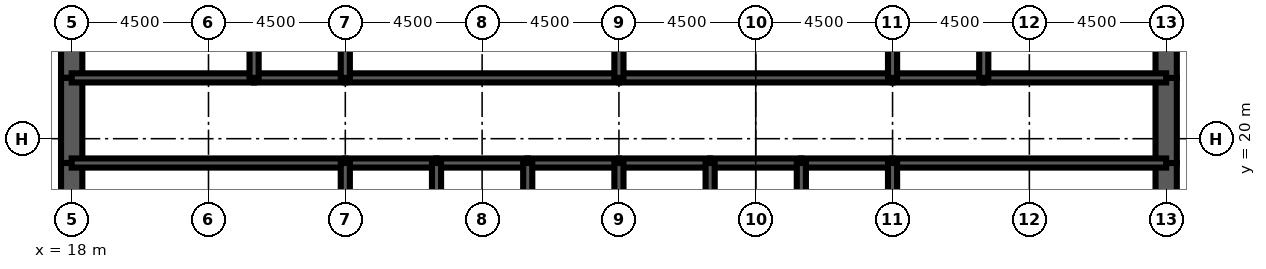
"""IFC4 building model, lengths in metres.
Left out: names, types, materials, properties, quantities, classifications, styles, units other than length and angle.
Written with IfcOpenShell. Run it as: python <this file> out.ifc"""

import sys

from ifc_helpers import new_model, si_unit, direction, frame, frame_2d, origin, place, context, subcontext, project, spatial, rectangle, extrude, element, fill, save


model = new_model("IFC4")
c1 = context("Model", 3, precision=1e-05, world=origin(), true_north=direction((0.0, 1.0)))
c2 = subcontext(c1, "Body", "Model", "MODEL_VIEW")
j1 = project(units=[si_unit("LENGTHUNIT", "METRE"), si_unit("PLANEANGLEUNIT", "RADIAN")], contexts=[c1])
p1 = place(None, origin())
s1 = spatial("IfcSite", under=j1, at=p1, CompositionType="ELEMENT")
p2 = place(p1, origin())
s2 = spatial("IfcBuilding", under=s1, at=p2, CompositionType="ELEMENT")
p3 = place(p2, frame((0.0, 0.0, 279.5)))
s3 = spatial("IfcBuildingStorey", under=s2, at=p3, CompositionType="ELEMENT", Elevation=279.5)
p4 = place(p3, frame((18.0, 26.0, 0.0), z_axis=(0.0, 0.0, 1.0), x_axis=(0.0, -1.0, 0.0)))
e1 = element("IfcWall", 1, at=p4, inside=s3, PredefinedType="SHEAR", context=c2, shape_type="SweptSolid", body=[
    extrude(rectangle(XDim=4.0, YDim=0.7, at=frame_2d((2.0, 0.0))), origin(), (0.0, 0.0, 1.0), 4.2),
])
p5 = place(p3, frame((18.0, 22.0, 0.0), z_axis=(0.0, 0.0, 1.0), x_axis=(0.0, -1.0, 0.0)))
e2 = element("IfcWall", 2, at=p5, inside=s3, PredefinedType="SHEAR", context=c2, shape_type="SweptSolid", body=[
    extrude(rectangle(XDim=2.8, YDim=0.7, at=frame_2d((1.4, 0.0))), origin(), (0.0, 0.0, 1.0), 4.2),
])
p6 = place(p5, frame((0.6, 0.0, 0.0)))
e3 = element("IfcOpeningElement", 3, at=p6, cuts=e2, PredefinedType="OPENING", context=c2, shape_type="SweptSolid", body=[
    extrude(rectangle(XDim=1.8, YDim=2.1, at=frame_2d((0.9, 1.05))), frame((0.0, 0.36, 0.0), z_axis=(0.0, -1.0, 0.0), x_axis=(1.0, 0.0, 0.0)), (0.0, 0.0, 1.0), 0.72),
])
for number, where, z_axis, x_axis in (
    (4, (18.0, 19.2, 0.0), (0.0, 0.0, 1.0), (0.0, -1.0, 0.0)),
    (5, (54.0, 16.0, 0.0), (0.0, 0.0, 1.0), (0.0, 1.0, 0.0)),
):
    element("IfcWall", number, at=place(p3, frame(where, z_axis=z_axis, x_axis=x_axis)), inside=s3, PredefinedType="SHEAR", context=c2, shape_type="SweptSolid", body=[
        extrude(rectangle(XDim=3.2, YDim=0.7, at=frame_2d((1.6, 0.0))), origin(), (0.0, 0.0, 1.0), 4.2),
    ])
p7 = place(p3, frame((54.0, 19.2, 0.0), z_axis=(0.0, 0.0, 1.0), x_axis=(0.0, 1.0, 0.0)))
e6 = element("IfcWall", 6, at=p7, inside=s3, PredefinedType="SHEAR", context=c2, shape_type="SweptSolid", body=[
    extrude(rectangle(XDim=2.8, YDim=0.7, at=frame_2d((1.4, 0.0))), origin(), (0.0, 0.0, 1.0), 4.2),
])
p8 = place(p7, frame((0.4, 0.0, 0.0)))
e7 = element("IfcOpeningElement", 7, at=p8, cuts=e6, PredefinedType="OPENING", context=c2, shape_type="SweptSolid", body=[
    extrude(rectangle(XDim=1.8, YDim=2.1, at=frame_2d((0.9, 1.05))), frame((0.0, 0.36, 0.0), z_axis=(0.0, -1.0, 0.0), x_axis=(1.0, 0.0, 0.0)), (0.0, 0.0, 1.0), 0.72),
])
p9 = place(p3, frame((54.0, 22.0, 0.0), z_axis=(0.0, 0.0, 1.0), x_axis=(0.0, 1.0, 0.0)))
e8 = element("IfcWall", 8, at=p9, inside=s3, PredefinedType="SHEAR", context=c2, shape_type="SweptSolid", body=[
    extrude(rectangle(XDim=4.0, YDim=0.7, at=frame_2d((2.0, 0.0))), origin(), (0.0, 0.0, 1.0), 4.2),
])
p10 = place(p3, frame((18.0, 19.2, 0.0), z_axis=(0.0, 0.0, 1.0), x_axis=(1.0, 0.0, 0.0)))
e9 = element("IfcWall", 9, at=p10, inside=s3, PredefinedType="SOLIDWALL", context=c2, shape_type="SweptSolid", body=[
    extrude(rectangle(XDim=9.0, YDim=0.3, at=frame_2d((4.5, 0.0))), origin(), (0.0, 0.0, 1.0), 4.2),
])
p11 = place(p10, frame((0.65, 0.0, 0.0)))
e10 = element("IfcOpeningElement", 10, at=p11, cuts=e9, PredefinedType="OPENING", context=c2, shape_type="SweptSolid", body=[
    extrude(rectangle(XDim=1.0, YDim=2.1, at=frame_2d((0.5, 1.05))), frame((0.0, 0.16, 0.0), z_axis=(0.0, -1.0, 0.0), x_axis=(1.0, 0.0, 0.0)), (0.0, 0.0, 1.0), 0.32),
])
p12 = place(p3, frame((27.0, 19.2, 0.0), z_axis=(0.0, 0.0, 1.0), x_axis=(1.0, 0.0, 0.0)))
e11 = element("IfcWall", 11, at=p12, inside=s3, PredefinedType="SOLIDWALL", context=c2, shape_type="SweptSolid", body=[
    extrude(rectangle(XDim=3.0, YDim=0.3, at=frame_2d((1.5, 0.0))), origin(), (0.0, 0.0, 1.0), 4.2),
])
p13 = place(p12, frame((0.95, 0.0, 0.0)))
e12 = element("IfcOpeningElement", 12, at=p13, cuts=e11, PredefinedType="OPENING", context=c2, shape_type="SweptSolid", body=[
    extrude(rectangle(XDim=1.1, YDim=2.2, at=frame_2d((0.55, 1.1))), frame((0.0, 0.16, 0.0), z_axis=(0.0, -1.0, 0.0), x_axis=(1.0, 0.0, 0.0)), (0.0, 0.0, 1.0), 0.32),
])
p14 = place(p3, frame((30.0, 19.2, 0.0), z_axis=(0.0, 0.0, 1.0), x_axis=(1.0, 0.0, 0.0)))
e13 = element("IfcWall", 13, at=p14, inside=s3, PredefinedType="SOLIDWALL", context=c2, shape_type="SweptSolid", body=[
    extrude(rectangle(XDim=3.0, YDim=0.3, at=frame_2d((1.5, 0.0))), origin(), (0.0, 0.0, 1.0), 4.2),
])
p15 = place(p14, frame((0.95, 0.0, 0.0)))
e14 = element("IfcOpeningElement", 14, at=p15, cuts=e13, PredefinedType="OPENING", context=c2, shape_type="SweptSolid", body=[
    extrude(rectangle(XDim=1.1, YDim=2.2, at=frame_2d((0.55, 1.1))), frame((0.0, 0.16, 0.0), z_axis=(0.0, -1.0, 0.0), x_axis=(1.0, 0.0, 0.0)), (0.0, 0.0, 1.0), 0.32),
])
p16 = place(p3, frame((33.0, 19.2, 0.0), z_axis=(0.0, 0.0, 1.0), x_axis=(1.0, 0.0, 0.0)))
e15 = element("IfcWall", 15, at=p16, inside=s3, PredefinedType="SOLIDWALL", context=c2, shape_type="SweptSolid", body=[
    extrude(rectangle(XDim=3.0, YDim=0.3, at=frame_2d((1.5, 0.0))), origin(), (0.0, 0.0, 1.0), 4.2),
])
p17 = place(p16, frame((0.95, 0.0, 0.0)))
e16 = element("IfcOpeningElement", 16, at=p17, cuts=e15, PredefinedType="OPENING", context=c2, shape_type="SweptSolid", body=[
    extrude(rectangle(XDim=1.1, YDim=2.2, at=frame_2d((0.55, 1.1))), frame((0.0, 0.16, 0.0), z_axis=(0.0, -1.0, 0.0), x_axis=(1.0, 0.0, 0.0)), (0.0, 0.0, 1.0), 0.32),
])
p18 = place(p3, frame((36.0, 19.2, 0.0), z_axis=(0.0, 0.0, 1.0), x_axis=(1.0, 0.0, 0.0)))
e17 = element("IfcWall", 17, at=p18, inside=s3, PredefinedType="SOLIDWALL", context=c2, shape_type="SweptSolid", body=[
    extrude(rectangle(XDim=3.0, YDim=0.3, at=frame_2d((1.5, 0.0))), origin(), (0.0, 0.0, 1.0), 4.2),
])
p19 = place(p18, frame((0.95, 0.0, 0.0)))
e18 = element("IfcOpeningElement", 18, at=p19, cuts=e17, PredefinedType="OPENING", context=c2, shape_type="SweptSolid", body=[
    extrude(rectangle(XDim=1.1, YDim=2.2, at=frame_2d((0.55, 1.1))), frame((0.0, 0.16, 0.0), z_axis=(0.0, -1.0, 0.0), x_axis=(1.0, 0.0, 0.0)), (0.0, 0.0, 1.0), 0.32),
])
p20 = place(p3, frame((39.0, 19.2, 0.0), z_axis=(0.0, 0.0, 1.0), x_axis=(1.0, 0.0, 0.0)))
e19 = element("IfcWall", 19, at=p20, inside=s3, PredefinedType="SOLIDWALL", context=c2, shape_type="SweptSolid", body=[
    extrude(rectangle(XDim=3.0, YDim=0.3, at=frame_2d((1.5, 0.0))), origin(), (0.0, 0.0, 1.0), 4.2),
])
p21 = place(p20, frame((1.0, 0.0, 0.0)))
e20 = element("IfcOpeningElement", 20, at=p21, cuts=e19, PredefinedType="OPENING", context=c2, shape_type="SweptSolid", body=[
    extrude(rectangle(XDim=1.0, YDim=2.1, at=frame_2d((0.5, 1.05))), frame((0.0, 0.16, 0.0), z_axis=(0.0, -1.0, 0.0), x_axis=(1.0, 0.0, 0.0)), (0.0, 0.0, 1.0), 0.32),
])
p22 = place(p3, frame((42.0, 19.2, 0.0), z_axis=(0.0, 0.0, 1.0), x_axis=(1.0, 0.0, 0.0)))
e21 = element("IfcWall", 21, at=p22, inside=s3, PredefinedType="SOLIDWALL", context=c2, shape_type="SweptSolid", body=[
    extrude(rectangle(XDim=3.0, YDim=0.3, at=frame_2d((1.5, 0.0))), origin(), (0.0, 0.0, 1.0), 4.2),
])
p23 = place(p22, frame((1.0, 0.0, 0.0)))
e22 = element("IfcOpeningElement", 22, at=p23, cuts=e21, PredefinedType="OPENING", context=c2, shape_type="SweptSolid", body=[
    extrude(rectangle(XDim=1.0, YDim=2.1, at=frame_2d((0.5, 1.05))), frame((0.0, 0.16, 0.0), z_axis=(0.0, -1.0, 0.0), x_axis=(1.0, 0.0, 0.0)), (0.0, 0.0, 1.0), 0.32),
])
p24 = place(p3, frame((45.0, 19.2, 0.0), z_axis=(0.0, 0.0, 1.0), x_axis=(1.0, 0.0, 0.0)))
e23 = element("IfcWall", 23, at=p24, inside=s3, PredefinedType="SOLIDWALL", context=c2, shape_type="SweptSolid", body=[
    extrude(rectangle(XDim=9.0, YDim=0.3, at=frame_2d((4.5, 0.0))), origin(), (0.0, 0.0, 1.0), 4.2),
])
p25 = place(p24, frame((7.35, 0.0, 0.0)))
e24 = element("IfcOpeningElement", 24, at=p25, cuts=e23, PredefinedType="OPENING", context=c2, shape_type="SweptSolid", body=[
    extrude(rectangle(XDim=1.0, YDim=2.1, at=frame_2d((0.5, 1.05))), frame((0.0, 0.16, 0.0), z_axis=(0.0, -1.0, 0.0), x_axis=(1.0, 0.0, 0.0)), (0.0, 0.0, 1.0), 0.32),
])
p26 = place(p3, frame((18.0, 22.0, 0.0), z_axis=(0.0, 0.0, 1.0), x_axis=(1.0, 0.0, 0.0)))
e25 = element("IfcWall", 25, at=p26, inside=s3, PredefinedType="SOLIDWALL", context=c2, shape_type="SweptSolid", body=[
    extrude(rectangle(XDim=6.0, YDim=0.3, at=frame_2d((3.0, 0.0))), origin(), (0.0, 0.0, 1.0), 4.2),
])
p27 = place(p26, frame((2.0, 0.0, 0.0)))
e26 = element("IfcOpeningElement", 26, at=p27, cuts=e25, PredefinedType="OPENING", context=c2, shape_type="SweptSolid", body=[
    extrude(rectangle(XDim=1.0, YDim=2.1, at=frame_2d((0.5, 1.05))), frame((0.0, 0.16, 0.0), z_axis=(0.0, -1.0, 0.0), x_axis=(1.0, 0.0, 0.0)), (0.0, 0.0, 1.0), 0.32),
])
p28 = place(p3, frame((24.0, 22.0, 0.0), z_axis=(0.0, 0.0, 1.0), x_axis=(1.0, 0.0, 0.0)))
e27 = element("IfcWall", 27, at=p28, inside=s3, PredefinedType="SOLIDWALL", context=c2, shape_type="SweptSolid", body=[
    extrude(rectangle(XDim=3.0, YDim=0.3, at=frame_2d((1.5, 0.0))), origin(), (0.0, 0.0, 1.0), 4.2),
])
p29 = place(p28, frame((1.0, 0.0, 0.0)))
e28 = element("IfcOpeningElement", 28, at=p29, cuts=e27, PredefinedType="OPENING", context=c2, shape_type="SweptSolid", body=[
    extrude(rectangle(XDim=1.0, YDim=2.1, at=frame_2d((0.5, 1.05))), frame((0.0, 0.16, 0.0), z_axis=(0.0, -1.0, 0.0), x_axis=(1.0, 0.0, 0.0)), (0.0, 0.0, 1.0), 0.32),
])
p30 = place(p3, frame((27.0, 22.0, 0.0), z_axis=(0.0, 0.0, 1.0), x_axis=(1.0, 0.0, 0.0)))
e29 = element("IfcWall", 29, at=p30, inside=s3, PredefinedType="SOLIDWALL", context=c2, shape_type="SweptSolid", body=[
    extrude(rectangle(XDim=9.0, YDim=0.3, at=frame_2d((4.5, 0.0))), origin(), (0.0, 0.0, 1.0), 4.2),
])
p31 = place(p30, frame((4.0, 0.0, 0.0)))
e30 = element("IfcOpeningElement", 30, at=p31, cuts=e29, PredefinedType="OPENING", context=c2, shape_type="SweptSolid", body=[
    extrude(rectangle(XDim=1.0, YDim=2.1, at=frame_2d((0.5, 1.05))), frame((0.0, 0.16, 0.0), z_axis=(0.0, -1.0, 0.0), x_axis=(1.0, 0.0, 0.0)), (0.0, 0.0, 1.0), 0.32),
])
p32 = place(p3, frame((36.0, 22.0, 0.0), z_axis=(0.0, 0.0, 1.0), x_axis=(1.0, 0.0, 0.0)))
e31 = element("IfcWall", 31, at=p32, inside=s3, PredefinedType="SOLIDWALL", context=c2, shape_type="SweptSolid", body=[
    extrude(rectangle(XDim=9.0, YDim=0.3, at=frame_2d((4.5, 0.0))), origin(), (0.0, 0.0, 1.0), 4.2),
])
p33 = place(p32, frame((4.0, 0.0, 0.0)))
e32 = element("IfcOpeningElement", 32, at=p33, cuts=e31, PredefinedType="OPENING", context=c2, shape_type="SweptSolid", body=[
    extrude(rectangle(XDim=1.0, YDim=2.1, at=frame_2d((0.5, 1.05))), frame((0.0, 0.16, 0.0), z_axis=(0.0, -1.0, 0.0), x_axis=(1.0, 0.0, 0.0)), (0.0, 0.0, 1.0), 0.32),
])
p34 = place(p3, frame((45.0, 22.0, 0.0), z_axis=(0.0, 0.0, 1.0), x_axis=(1.0, 0.0, 0.0)))
e33 = element("IfcWall", 33, at=p34, inside=s3, PredefinedType="SOLIDWALL", context=c2, shape_type="SweptSolid", body=[
    extrude(rectangle(XDim=3.0, YDim=0.3, at=frame_2d((1.5, 0.0))), origin(), (0.0, 0.0, 1.0), 4.2),
])
p35 = place(p34, frame((1.0, 0.0, 0.0)))
e34 = element("IfcOpeningElement", 34, at=p35, cuts=e33, PredefinedType="OPENING", context=c2, shape_type="SweptSolid", body=[
    extrude(rectangle(XDim=1.0, YDim=2.1, at=frame_2d((0.5, 1.05))), frame((0.0, 0.16, 0.0), z_axis=(0.0, -1.0, 0.0), x_axis=(1.0, 0.0, 0.0)), (0.0, 0.0, 1.0), 0.32),
])
p36 = place(p3, frame((48.0, 22.0, 0.0), z_axis=(0.0, 0.0, 1.0), x_axis=(1.0, 0.0, 0.0)))
e35 = element("IfcWall", 35, at=p36, inside=s3, PredefinedType="SOLIDWALL", context=c2, shape_type="SweptSolid", body=[
    extrude(rectangle(XDim=6.0, YDim=0.3, at=frame_2d((3.0, 0.0))), origin(), (0.0, 0.0, 1.0), 4.2),
])
p37 = place(p36, frame((2.0, 0.0, 0.0)))
e36 = element("IfcOpeningElement", 36, at=p37, cuts=e35, PredefinedType="OPENING", context=c2, shape_type="SweptSolid", body=[
    extrude(rectangle(XDim=1.0, YDim=2.1, at=frame_2d((0.5, 1.05))), frame((0.0, 0.16, 0.0), z_axis=(0.0, -1.0, 0.0), x_axis=(1.0, 0.0, 0.0)), (0.0, 0.0, 1.0), 0.32),
])
p38 = place(p36, frame((4.1, 0.0, 0.0)))
e37 = element("IfcOpeningElement", 37, at=p38, cuts=e35, PredefinedType="OPENING", context=c2, shape_type="SweptSolid", body=[
    extrude(rectangle(XDim=1.0, YDim=2.1, at=frame_2d((0.5, 1.05))), frame((0.0, 0.16, 0.0), z_axis=(0.0, -1.0, 0.0), x_axis=(1.0, 0.0, 0.0)), (0.0, 0.0, 1.0), 0.32),
])
for number, where, z_axis, x_axis in (
    (38, (27.0, 16.0, 0.0), (0.0, 0.0, 1.0), (0.0, 1.0, 0.0)),
    (39, (30.0, 16.0, 0.0), (0.0, 0.0, 1.0), (0.0, 1.0, 0.0)),
    (40, (33.0, 16.0, 0.0), (0.0, 0.0, 1.0), (0.0, 1.0, 0.0)),
    (41, (36.0, 16.0, 0.0), (0.0, 0.0, 1.0), (0.0, 1.0, 0.0)),
    (42, (39.0, 16.0, 0.0), (0.0, 0.0, 1.0), (0.0, 1.0, 0.0)),
    (43, (42.0, 16.0, 0.0), (0.0, 0.0, 1.0), (0.0, 1.0, 0.0)),
    (44, (45.0, 16.0, 0.0), (0.0, 0.0, 1.0), (0.0, 1.0, 0.0)),
):
    element("IfcWall", number, at=place(p3, frame(where, z_axis=z_axis, x_axis=x_axis)), inside=s3, PredefinedType="SOLIDWALL", context=c2, shape_type="SweptSolid", body=[
        extrude(rectangle(XDim=3.2, YDim=0.3, at=frame_2d((1.6, 0.0))), origin(), (0.0, 0.0, 1.0), 4.2),
    ])
for number, where, z_axis, x_axis in (
    (45, (24.0, 22.0, 0.0), (0.0, 0.0, 1.0), (0.0, 1.0, 0.0)),
    (46, (27.0, 22.0, 0.0), (0.0, 0.0, 1.0), (0.0, 1.0, 0.0)),
    (47, (36.0, 22.0, 0.0), (0.0, 0.0, 1.0), (0.0, 1.0, 0.0)),
    (48, (45.0, 22.0, 0.0), (0.0, 0.0, 1.0), (0.0, 1.0, 0.0)),
    (49, (48.0, 22.0, 0.0), (0.0, 0.0, 1.0), (0.0, 1.0, 0.0)),
):
    element("IfcWall", number, at=place(p3, frame(where, z_axis=z_axis, x_axis=x_axis)), inside=s3, PredefinedType="SOLIDWALL", context=c2, shape_type="SweptSolid", body=[
        extrude(rectangle(XDim=4.0, YDim=0.3, at=frame_2d((2.0, 0.0))), origin(), (0.0, 0.0, 1.0), 4.2),
    ])
p39 = place(p3, frame((42.5, 22.15, 0.0), z_axis=(0.0, 0.0, 1.0), x_axis=(0.0, 1.0, 0.0)))
e50 = element("IfcWall", 50, at=p39, inside=s3, PredefinedType="PARTITIONING", context=c2, shape_type="SweptSolid", body=[
    extrude(rectangle(XDim=3.7, YDim=0.15, at=frame_2d((1.85, 0.0))), origin(), (0.0, 0.0, 1.0), 3.0),
])
p40 = place(p39, frame((2.2, 0.0, 0.0)))
e51 = element("IfcOpeningElement", 51, at=p40, cuts=e50, PredefinedType="OPENING", context=c2, shape_type="SweptSolid", body=[
    extrude(rectangle(XDim=1.0, YDim=2.1, at=frame_2d((0.5, 1.05))), frame((0.0, 0.085, 0.0), z_axis=(0.0, -1.0, 0.0), x_axis=(1.0, 0.0, 0.0)), (0.0, 0.0, 1.0), 0.17),
])
p41 = place(p3, frame((51.475, 22.15, 0.0), z_axis=(0.0, 0.0, 1.0), x_axis=(0.0, 1.0, 0.0)))
e52 = element("IfcWall", 52, at=p41, inside=s3, PredefinedType="PARTITIONING", context=c2, shape_type="SweptSolid", body=[
    extrude(rectangle(XDim=3.7, YDim=0.15, at=frame_2d((1.85, 0.0))), origin(), (0.0, 0.0, 1.0), 3.0),
])
p42 = place(p13, origin())
e53 = element("IfcDoor", 53, at=p42, inside=s3, OperationType="DOUBLE_DOOR_SLIDING", PredefinedType="USERDEFINED", context=c2, shape_type="SweptSolid", body=[
    extrude(rectangle(XDim=1.1, YDim=2.2, at=frame_2d((0.55, 1.1))), frame((0.0, 0.025, 0.0), z_axis=(0.0, -1.0, 0.0), x_axis=(1.0, 0.0, 0.0)), (0.0, 0.0, 1.0), 0.05),
])
fill(e12, e53)
p43 = place(p15, origin())
e54 = element("IfcDoor", 54, at=p43, inside=s3, OperationType="DOUBLE_DOOR_SLIDING", PredefinedType="USERDEFINED", context=c2, shape_type="SweptSolid", body=[
    extrude(rectangle(XDim=1.1, YDim=2.2, at=frame_2d((0.55, 1.1))), frame((0.0, 0.025, 0.0), z_axis=(0.0, -1.0, 0.0), x_axis=(1.0, 0.0, 0.0)), (0.0, 0.0, 1.0), 0.05),
])
fill(e14, e54)
p44 = place(p17, origin())
e55 = element("IfcDoor", 55, at=p44, inside=s3, OperationType="DOUBLE_DOOR_SLIDING", PredefinedType="USERDEFINED", context=c2, shape_type="SweptSolid", body=[
    extrude(rectangle(XDim=1.1, YDim=2.2, at=frame_2d((0.55, 1.1))), frame((0.0, 0.025, 0.0), z_axis=(0.0, -1.0, 0.0), x_axis=(1.0, 0.0, 0.0)), (0.0, 0.0, 1.0), 0.05),
])
fill(e16, e55)
p45 = place(p19, origin())
e56 = element("IfcDoor", 56, at=p45, inside=s3, OperationType="DOUBLE_DOOR_SLIDING", PredefinedType="USERDEFINED", context=c2, shape_type="SweptSolid", body=[
    extrude(rectangle(XDim=1.1, YDim=2.2, at=frame_2d((0.55, 1.1))), frame((0.0, 0.025, 0.0), z_axis=(0.0, -1.0, 0.0), x_axis=(1.0, 0.0, 0.0)), (0.0, 0.0, 1.0), 0.05),
])
fill(e18, e56)
p46 = place(p11, origin())
e57 = element("IfcDoor", 57, at=p46, inside=s3, OperationType="SINGLE_SWING_LEFT", PredefinedType="DOOR", context=c2, shape_type="SweptSolid", body=[
    extrude(rectangle(XDim=1.0, YDim=2.1, at=frame_2d((0.5, 1.05))), frame((0.0, 0.025, 0.0), z_axis=(0.0, -1.0, 0.0), x_axis=(1.0, 0.0, 0.0)), (0.0, 0.0, 1.0), 0.05),
])
fill(e10, e57)
p47 = place(p25, origin())
e58 = element("IfcDoor", 58, at=p47, inside=s3, OperationType="SINGLE_SWING_RIGHT", PredefinedType="DOOR", context=c2, shape_type="SweptSolid", body=[
    extrude(rectangle(XDim=1.0, YDim=2.1, at=frame_2d((0.5, 1.05))), frame((0.0, 0.025, 0.0), z_axis=(0.0, -1.0, 0.0), x_axis=(1.0, 0.0, 0.0)), (0.0, 0.0, 1.0), 0.05),
])
fill(e24, e58)
p48 = place(p6, origin())
e59 = element("IfcDoor", 59, at=p48, inside=s3, OperationType="SINGLE_SWING_LEFT", PredefinedType="DOOR", context=c2, shape_type="SweptSolid", body=[
    extrude(rectangle(XDim=1.8, YDim=2.1, at=frame_2d((0.9, 1.05))), frame((0.0, 0.35, 0.0), z_axis=(0.0, -1.0, 0.0), x_axis=(1.0, 0.0, 0.0)), (0.0, 0.0, 1.0), 0.699),
])
fill(e3, e59)
p49 = place(p8, origin())
e60 = element("IfcDoor", 60, at=p49, inside=s3, OperationType="SINGLE_SWING_LEFT", PredefinedType="DOOR", context=c2, shape_type="SweptSolid", body=[
    extrude(rectangle(XDim=1.8, YDim=2.1, at=frame_2d((0.9, 1.05))), frame((0.0, 0.35, 0.0), z_axis=(0.0, -1.0, 0.0), x_axis=(1.0, 0.0, 0.0)), (0.0, 0.0, 1.0), 0.699),
])
fill(e7, e60)
p50 = place(p27, origin())
e61 = element("IfcDoor", 61, at=p50, inside=s3, OperationType="SINGLE_SWING_LEFT", PredefinedType="DOOR", context=c2, shape_type="SweptSolid", body=[
    extrude(rectangle(XDim=1.0, YDim=2.1, at=frame_2d((0.5, 1.05))), frame((0.0, 0.025, 0.0), z_axis=(0.0, -1.0, 0.0), x_axis=(1.0, 0.0, 0.0)), (0.0, 0.0, 1.0), 0.05),
])
fill(e26, e61)
p51 = place(p29, origin())
e62 = element("IfcDoor", 62, at=p51, inside=s3, OperationType="SINGLE_SWING_LEFT", PredefinedType="DOOR", context=c2, shape_type="SweptSolid", body=[
    extrude(rectangle(XDim=1.0, YDim=2.1, at=frame_2d((0.5, 1.05))), frame((0.0, 0.025, 0.0), z_axis=(0.0, -1.0, 0.0), x_axis=(1.0, 0.0, 0.0)), (0.0, 0.0, 1.0), 0.05),
])
fill(e28, e62)
p52 = place(p31, origin())
e63 = element("IfcDoor", 63, at=p52, inside=s3, OperationType="SINGLE_SWING_LEFT", PredefinedType="DOOR", context=c2, shape_type="SweptSolid", body=[
    extrude(rectangle(XDim=1.0, YDim=2.1, at=frame_2d((0.5, 1.05))), frame((0.0, 0.025, 0.0), z_axis=(0.0, -1.0, 0.0), x_axis=(1.0, 0.0, 0.0)), (0.0, 0.0, 1.0), 0.05),
])
fill(e30, e63)
p53 = place(p33, origin())
e64 = element("IfcDoor", 64, at=p53, inside=s3, OperationType="SINGLE_SWING_LEFT", PredefinedType="DOOR", context=c2, shape_type="SweptSolid", body=[
    extrude(rectangle(XDim=1.0, YDim=2.1, at=frame_2d((0.5, 1.05))), frame((0.0, 0.025, 0.0), z_axis=(0.0, -1.0, 0.0), x_axis=(1.0, 0.0, 0.0)), (0.0, 0.0, 1.0), 0.05),
])
fill(e32, e64)
p54 = place(p35, origin())
e65 = element("IfcDoor", 65, at=p54, inside=s3, OperationType="SINGLE_SWING_LEFT", PredefinedType="DOOR", context=c2, shape_type="SweptSolid", body=[
    extrude(rectangle(XDim=1.0, YDim=2.1, at=frame_2d((0.5, 1.05))), frame((0.0, 0.025, 0.0), z_axis=(0.0, -1.0, 0.0), x_axis=(1.0, 0.0, 0.0)), (0.0, 0.0, 1.0), 0.05),
])
fill(e34, e65)
p55 = place(p37, origin())
e66 = element("IfcDoor", 66, at=p55, inside=s3, OperationType="SINGLE_SWING_LEFT", PredefinedType="DOOR", context=c2, shape_type="SweptSolid", body=[
    extrude(rectangle(XDim=1.0, YDim=2.1, at=frame_2d((0.5, 1.05))), frame((0.0, 0.025, 0.0), z_axis=(0.0, -1.0, 0.0), x_axis=(1.0, 0.0, 0.0)), (0.0, 0.0, 1.0), 0.05),
])
fill(e36, e66)
p56 = place(p38, origin())
e67 = element("IfcDoor", 67, at=p56, inside=s3, OperationType="SINGLE_SWING_RIGHT", PredefinedType="DOOR", context=c2, shape_type="SweptSolid", body=[
    extrude(rectangle(XDim=1.0, YDim=2.1, at=frame_2d((0.5, 1.05))), frame((0.0, 0.025, 0.0), z_axis=(0.0, -1.0, 0.0), x_axis=(1.0, 0.0, 0.0)), (0.0, 0.0, 1.0), 0.05),
])
fill(e37, e67)
p57 = place(p21, origin())
e68 = element("IfcDoor", 68, at=p57, inside=s3, OperationType="SINGLE_SWING_LEFT", PredefinedType="DOOR", context=c2, shape_type="SweptSolid", body=[
    extrude(rectangle(XDim=1.0, YDim=2.1, at=frame_2d((0.5, 1.05))), frame((0.0, 0.025, 0.0), z_axis=(0.0, -1.0, 0.0), x_axis=(1.0, 0.0, 0.0)), (0.0, 0.0, 1.0), 0.05),
])
fill(e20, e68)
p58 = place(p23, origin())
e69 = element("IfcDoor", 69, at=p58, inside=s3, OperationType="SINGLE_SWING_LEFT", PredefinedType="DOOR", context=c2, shape_type="SweptSolid", body=[
    extrude(rectangle(XDim=1.0, YDim=2.1, at=frame_2d((0.5, 1.05))), frame((0.0, 0.025, 0.0), z_axis=(0.0, -1.0, 0.0), x_axis=(1.0, 0.0, 0.0)), (0.0, 0.0, 1.0), 0.05),
])
fill(e22, e69)
save(model, sys.argv[1])
